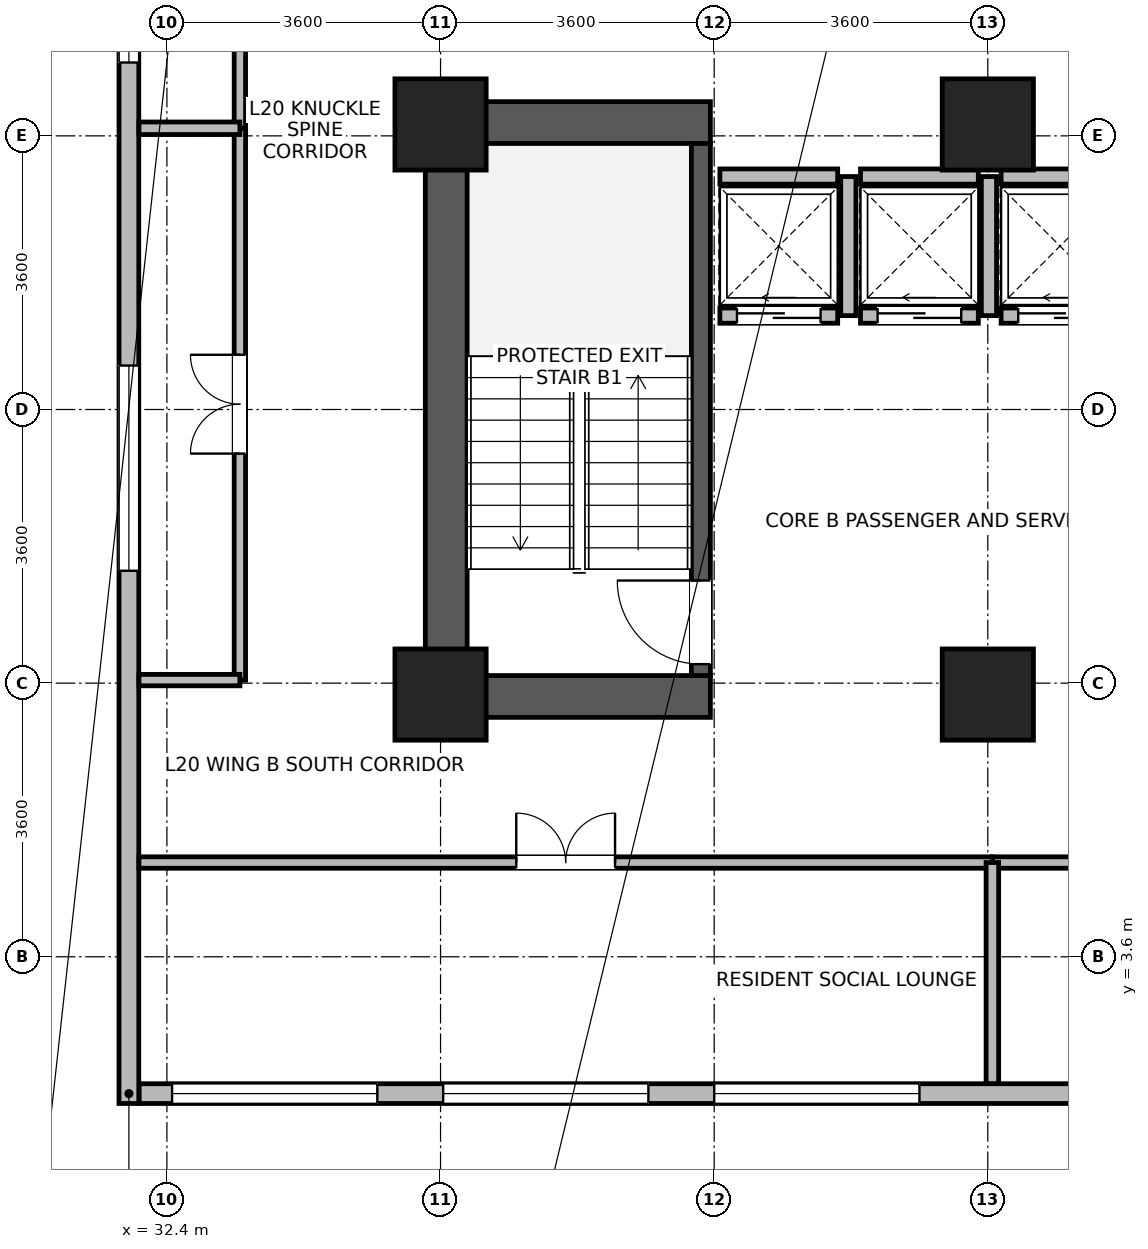
"""IFC4 building model, lengths in metres.
Left out: names, types, materials, properties, quantities, classifications, styles, units other than length and angle.
Written with IfcOpenShell. Run it as: python <this file> out.ifc"""

import sys

from ifc_helpers import new_model, si_unit, direction, frame, frame_2d, origin, origin_2d, place, context, subcontext, project, spatial, rectangle, extrude, source, transform, mapped, element, fill, save


model = new_model("IFC4")
c1 = context("Model", 3, precision=1e-05, world=origin(), true_north=direction((0.0, 1.0)))
c2 = subcontext(c1, "Body", "Model", "MODEL_VIEW")
j1 = project(units=[si_unit("LENGTHUNIT", "METRE"), si_unit("PLANEANGLEUNIT", "RADIAN")], contexts=[c1])
p1 = place(None, origin())
s1 = spatial("IfcSite", under=j1, at=p1, CompositionType="ELEMENT")
p2 = place(p1, origin())
s2 = spatial("IfcBuilding", under=s1, at=p2, CompositionType="ELEMENT")
p3 = place(p2, frame((0.0, 0.0, 82.3)))
s3 = spatial("IfcBuildingStorey", under=s2, at=p3, CompositionType="ELEMENT", Elevation=82.3)
p4 = place(p3, frame((36.075, 6.75, 0.0), z_axis=(0.0, 0.0, 1.0), x_axis=(0.0, 1.0, 0.0)))
e1 = element("IfcWall", 1, at=p4, inside=s3, PredefinedType="SHEAR", context=c2, shape_type="SweptSolid", body=[
    extrude(rectangle(XDim=8.1, YDim=0.55, at=frame_2d((4.05, 0.0))), origin(), (0.0, 0.0, 1.0), 3.45),
])
for number, where, z_axis, x_axis in (
    (2, (36.35, 7.025, 0.0), (0.0, 0.0, 1.0), (1.0, 0.0, 0.0)),
    (3, (36.35, 14.575, 0.0), (0.0, 0.0, 1.0), (1.0, 0.0, 0.0)),
):
    element("IfcWall", number, at=place(p3, frame(where, z_axis=z_axis, x_axis=x_axis)), inside=s3, PredefinedType="SHEAR", context=c2, shape_type="SweptSolid", body=[
        extrude(rectangle(XDim=3.2, YDim=0.55, at=frame_2d((1.6, 0.0))), origin(), (0.0, 0.0, 1.0), 3.45),
    ])
p5 = place(p3, frame((39.425, 7.3, 0.0), z_axis=(0.0, 0.0, 1.0), x_axis=(0.0, 1.0, 0.0)))
e4 = element("IfcWall", 4, at=p5, inside=s3, PredefinedType="SHEAR", context=c2, shape_type="SweptSolid", body=[
    extrude(rectangle(XDim=7.0, YDim=0.25, at=frame_2d((3.5, 0.0))), origin(), (0.0, 0.0, 1.0), 3.45),
])
p6 = place(p5, frame((0.15, 0.0, 0.0)))
e5 = element("IfcOpeningElement", 5, at=p6, cuts=e4, PredefinedType="OPENING", context=c2, shape_type="SweptSolid", body=[
    extrude(rectangle(XDim=1.1, YDim=2.08, at=frame_2d((0.55, 1.04))), frame((0.0, 0.135, 0.0), z_axis=(0.0, -1.0, 0.0), x_axis=(1.0, 0.0, 0.0)), (0.0, 0.0, 1.0), 0.27),
])
m1 = source(origin(), c2, "Body", "SweptSolid", [
    extrude(rectangle(XDim=1.2, YDim=1.2, at=origin_2d()), origin(), (0.0, 0.0, 1.0), 3.7),
])
for number, where, z_axis, x_axis in (
    (6, (36.0, 7.05, 0.0), (0.0, 0.0, 1.0), (1.0, 0.0, 0.0)),
    (7, (36.0, 14.55, 0.0), (0.0, 0.0, 1.0), (1.0, 0.0, 0.0)),
    (8, (43.2, 7.05, 0.0), (0.0, 0.0, 1.0), (1.0, 0.0, 0.0)),
    (9, (43.2, 14.55, 0.0), (0.0, 0.0, 1.0), (1.0, 0.0, 0.0)),
):
    element("IfcColumn", number, at=place(p3, frame(where, z_axis=z_axis, x_axis=x_axis)), inside=s3, PredefinedType="COLUMN", context=c2, shape_type="MappedRepresentation", body=[
        mapped(m1, transform((0.0, 0.0, 0.0), x_axis=(1.0, 0.0, 0.0), y_axis=(0.0, 1.0, 0.0), z_axis=(0.0, 0.0, 1.0), scale=1.0)),
    ])
p7 = place(p3, frame((60.565, 1.8, 0.0), z_axis=(0.0, 0.0, 1.0), x_axis=(-1.0, 0.0, 0.0)))
e10 = element("IfcWall", 10, at=p7, inside=s3, PredefinedType="STANDARD", context=c2, shape_type="SweptSolid", body=[
    extrude(rectangle(XDim=28.53, YDim=0.26, at=frame_2d((14.265, 0.0))), origin(), (0.0, 0.0, 1.0), 3.43),
])
p8 = place(p7, frame((0.433, 0.0, 0.85)))
e11 = element("IfcOpeningElement", 11, at=p8, cuts=e10, PredefinedType="OPENING", context=c2, shape_type="SweptSolid", body=[
    extrude(rectangle(XDim=2.7, YDim=2.05, at=frame_2d((1.35, 1.025))), frame((0.0, 0.14, 0.0), z_axis=(0.0, -1.0, 0.0), x_axis=(1.0, 0.0, 0.0)), (0.0, 0.0, 1.0), 0.28),
])
p9 = place(p7, frame((7.566, 0.0, 0.85)))
e12 = element("IfcOpeningElement", 12, at=p9, cuts=e10, PredefinedType="OPENING", context=c2, shape_type="SweptSolid", body=[
    extrude(rectangle(XDim=2.7, YDim=2.05, at=frame_2d((1.35, 1.025))), frame((0.0, 0.14, 0.0), z_axis=(0.0, -1.0, 0.0), x_axis=(1.0, 0.0, 0.0)), (0.0, 0.0, 1.0), 0.28),
])
p10 = place(p7, frame((11.132, 0.0, 0.85)))
e13 = element("IfcOpeningElement", 13, at=p10, cuts=e10, PredefinedType="OPENING", context=c2, shape_type="SweptSolid", body=[
    extrude(rectangle(XDim=2.7, YDim=2.05, at=frame_2d((1.35, 1.025))), frame((0.0, 0.14, 0.0), z_axis=(0.0, -1.0, 0.0), x_axis=(1.0, 0.0, 0.0)), (0.0, 0.0, 1.0), 0.28),
])
p11 = place(p7, frame((18.264, 0.0, 0.85)))
e14 = element("IfcOpeningElement", 14, at=p11, cuts=e10, PredefinedType="OPENING", context=c2, shape_type="SweptSolid", body=[
    extrude(rectangle(XDim=2.7, YDim=2.05, at=frame_2d((1.35, 1.025))), frame((0.0, 0.14, 0.0), z_axis=(0.0, -1.0, 0.0), x_axis=(1.0, 0.0, 0.0)), (0.0, 0.0, 1.0), 0.28),
])
p12 = place(p7, frame((21.831, 0.0, 0.85)))
e15 = element("IfcOpeningElement", 15, at=p12, cuts=e10, PredefinedType="OPENING", context=c2, shape_type="SweptSolid", body=[
    extrude(rectangle(XDim=2.7, YDim=2.05, at=frame_2d((1.35, 1.025))), frame((0.0, 0.14, 0.0), z_axis=(0.0, -1.0, 0.0), x_axis=(1.0, 0.0, 0.0)), (0.0, 0.0, 1.0), 0.28),
])
p13 = place(p7, frame((25.397, 0.0, 0.85)))
e16 = element("IfcOpeningElement", 16, at=p13, cuts=e10, PredefinedType="OPENING", context=c2, shape_type="SweptSolid", body=[
    extrude(rectangle(XDim=2.7, YDim=2.05, at=frame_2d((1.35, 1.025))), frame((0.0, 0.14, 0.0), z_axis=(0.0, -1.0, 0.0), x_axis=(1.0, 0.0, 0.0)), (0.0, 0.0, 1.0), 0.28),
])
p14 = place(p3, frame((31.9, 1.67, 0.0), z_axis=(0.0, 0.0, 1.0), x_axis=(0.0, 1.0, 0.0)))
e17 = element("IfcWall", 17, at=p14, inside=s3, PredefinedType="STANDARD", context=c2, shape_type="SweptSolid", body=[
    extrude(rectangle(XDim=20.06, YDim=0.26, at=frame_2d((10.03, 0.0))), origin(), (0.0, 0.0, 1.0), 3.43),
])
p15 = place(p14, frame((7.008, 0.0, 0.85)))
e18 = element("IfcOpeningElement", 18, at=p15, cuts=e17, PredefinedType="OPENING", context=c2, shape_type="SweptSolid", body=[
    extrude(rectangle(XDim=2.7, YDim=2.05, at=frame_2d((1.35, 1.025))), frame((0.0, 0.14, 0.0), z_axis=(0.0, -1.0, 0.0), x_axis=(1.0, 0.0, 0.0)), (0.0, 0.0, 1.0), 0.28),
])
p16 = place(p14, frame((13.695, 0.0, 0.85)))
e19 = element("IfcOpeningElement", 19, at=p16, cuts=e17, PredefinedType="OPENING", context=c2, shape_type="SweptSolid", body=[
    extrude(rectangle(XDim=2.7, YDim=2.05, at=frame_2d((1.35, 1.025))), frame((0.0, 0.14, 0.0), z_axis=(0.0, -1.0, 0.0), x_axis=(1.0, 0.0, 0.0)), (0.0, 0.0, 1.0), 0.28),
])
p17 = place(p3, frame((39.675, 12.035, 0.0), z_axis=(0.0, 0.0, 1.0), x_axis=(1.0, 0.0, 0.0)))
e20 = element("IfcWall", 20, at=p17, inside=s3, PredefinedType="PARTITIONING", context=c2, shape_type="SweptSolid", body=[
    extrude(rectangle(XDim=1.55, YDim=0.2, at=frame_2d((0.775, 0.0))), origin(), (0.0, 0.0, 1.0), 3.43),
])
p18 = place(p17, frame((0.225, 0.0, 0.0)))
e21 = element("IfcOpeningElement", 21, at=p18, cuts=e20, PredefinedType="OPENING", context=c2, shape_type="SweptSolid", body=[
    extrude(rectangle(XDim=1.1, YDim=2.12, at=frame_2d((0.55, 1.06))), frame((0.0, 0.11, 0.0), z_axis=(0.0, -1.0, 0.0), x_axis=(1.0, 0.0, 0.0)), (0.0, 0.0, 1.0), 0.22),
])
p19 = place(p3, frame((39.675, 13.865, 0.0), z_axis=(0.0, 0.0, 1.0), x_axis=(1.0, 0.0, 0.0)))
e22 = element("IfcWall", 22, at=p19, inside=s3, PredefinedType="PARTITIONING", context=c2, shape_type="SweptSolid", body=[
    extrude(rectangle(XDim=1.55, YDim=0.2, at=frame_2d((0.775, 0.0))), origin(), (0.0, 0.0, 1.0), 3.43),
])
p20 = place(p3, frame((41.365, 12.035, 0.0), z_axis=(0.0, 0.0, 1.0), x_axis=(0.0, 1.0, 0.0)))
e23 = element("IfcWall", 23, at=p20, inside=s3, PredefinedType="PARTITIONING", context=c2, shape_type="SweptSolid", body=[
    extrude(rectangle(XDim=1.83, YDim=0.2, at=frame_2d((0.915, 0.0))), origin(), (0.0, 0.0, 1.0), 3.43),
])
p21 = place(p3, frame((41.525, 12.035, 0.0), z_axis=(0.0, 0.0, 1.0), x_axis=(1.0, 0.0, 0.0)))
e24 = element("IfcWall", 24, at=p21, inside=s3, PredefinedType="PARTITIONING", context=c2, shape_type="SweptSolid", body=[
    extrude(rectangle(XDim=1.55, YDim=0.2, at=frame_2d((0.775, 0.0))), origin(), (0.0, 0.0, 1.0), 3.43),
])
p22 = place(p21, frame((0.225, 0.0, 0.0)))
e25 = element("IfcOpeningElement", 25, at=p22, cuts=e24, PredefinedType="OPENING", context=c2, shape_type="SweptSolid", body=[
    extrude(rectangle(XDim=1.1, YDim=2.12, at=frame_2d((0.55, 1.06))), frame((0.0, 0.11, 0.0), z_axis=(0.0, -1.0, 0.0), x_axis=(1.0, 0.0, 0.0)), (0.0, 0.0, 1.0), 0.22),
])
p23 = place(p3, frame((41.525, 13.865, 0.0), z_axis=(0.0, 0.0, 1.0), x_axis=(1.0, 0.0, 0.0)))
e26 = element("IfcWall", 26, at=p23, inside=s3, PredefinedType="PARTITIONING", context=c2, shape_type="SweptSolid", body=[
    extrude(rectangle(XDim=1.55, YDim=0.2, at=frame_2d((0.775, 0.0))), origin(), (0.0, 0.0, 1.0), 3.43),
])
p24 = place(p3, frame((43.215, 12.035, 0.0), z_axis=(0.0, 0.0, 1.0), x_axis=(0.0, 1.0, 0.0)))
e27 = element("IfcWall", 27, at=p24, inside=s3, PredefinedType="PARTITIONING", context=c2, shape_type="SweptSolid", body=[
    extrude(rectangle(XDim=1.83, YDim=0.2, at=frame_2d((0.915, 0.0))), origin(), (0.0, 0.0, 1.0), 3.43),
])
p25 = place(p3, frame((43.375, 12.035, 0.0), z_axis=(0.0, 0.0, 1.0), x_axis=(1.0, 0.0, 0.0)))
e28 = element("IfcWall", 28, at=p25, inside=s3, PredefinedType="PARTITIONING", context=c2, shape_type="SweptSolid", body=[
    extrude(rectangle(XDim=1.55, YDim=0.2, at=frame_2d((0.775, 0.0))), origin(), (0.0, 0.0, 1.0), 3.43),
])
p26 = place(p25, frame((0.225, 0.0, 0.0)))
e29 = element("IfcOpeningElement", 29, at=p26, cuts=e28, PredefinedType="OPENING", context=c2, shape_type="SweptSolid", body=[
    extrude(rectangle(XDim=1.1, YDim=2.12, at=frame_2d((0.55, 1.06))), frame((0.0, 0.11, 0.0), z_axis=(0.0, -1.0, 0.0), x_axis=(1.0, 0.0, 0.0)), (0.0, 0.0, 1.0), 0.22),
])
p27 = place(p3, frame((43.375, 13.865, 0.0), z_axis=(0.0, 0.0, 1.0), x_axis=(1.0, 0.0, 0.0)))
e30 = element("IfcWall", 30, at=p27, inside=s3, PredefinedType="PARTITIONING", context=c2, shape_type="SweptSolid", body=[
    extrude(rectangle(XDim=1.55, YDim=0.2, at=frame_2d((0.775, 0.0))), origin(), (0.0, 0.0, 1.0), 3.43),
])
p28 = place(p3, frame((43.26, 4.84, 0.0), z_axis=(0.0, 0.0, 1.0), x_axis=(1.0, 0.0, 0.0)))
e31 = element("IfcWall", 31, at=p28, inside=s3, PredefinedType="PARTITIONING", context=c2, shape_type="SweptSolid", body=[
    extrude(rectangle(XDim=11.76, YDim=0.15, at=frame_2d((5.88, 0.0))), origin(), (0.0, 0.0, 1.0), 3.43),
])
p29 = place(p28, frame((5.23, 0.0, 0.0)))
e32 = element("IfcOpeningElement", 32, at=p29, cuts=e31, PredefinedType="OPENING", context=c2, shape_type="SweptSolid", body=[
    extrude(rectangle(XDim=1.3, YDim=2.12, at=frame_2d((0.65, 1.06))), frame((0.0, 0.085, 0.0), z_axis=(0.0, -1.0, 0.0), x_axis=(1.0, 0.0, 0.0)), (0.0, 0.0, 1.0), 0.17),
])
p30 = place(p3, frame((32.032, 4.84, 0.0), z_axis=(0.0, 0.0, 1.0), x_axis=(1.0, 0.0, 0.0)))
e33 = element("IfcWall", 33, at=p30, inside=s3, PredefinedType="PARTITIONING", context=c2, shape_type="SweptSolid", body=[
    extrude(rectangle(XDim=11.228, YDim=0.15, at=frame_2d((5.614, 0.0))), origin(), (0.0, 0.0, 1.0), 3.43),
])
p31 = place(p30, frame((4.964, 0.0, 0.0)))
e34 = element("IfcOpeningElement", 34, at=p31, cuts=e33, PredefinedType="OPENING", context=c2, shape_type="SweptSolid", body=[
    extrude(rectangle(XDim=1.3, YDim=2.12, at=frame_2d((0.65, 1.06))), frame((0.0, 0.085, 0.0), z_axis=(0.0, -1.0, 0.0), x_axis=(1.0, 0.0, 0.0)), (0.0, 0.0, 1.0), 0.17),
])
p32 = place(p3, frame((33.36, 7.24, 0.0), z_axis=(0.0, 0.0, 1.0), x_axis=(0.0, 1.0, 0.0)))
e35 = element("IfcWall", 35, at=p32, inside=s3, PredefinedType="PARTITIONING", context=c2, shape_type="SweptSolid", body=[
    extrude(rectangle(XDim=7.26, YDim=0.15, at=frame_2d((3.63, 0.0))), origin(), (0.0, 0.0, 1.0), 3.43),
])
p33 = place(p32, frame((2.98, 0.0, 0.0)))
e36 = element("IfcOpeningElement", 36, at=p33, cuts=e35, PredefinedType="OPENING", context=c2, shape_type="SweptSolid", body=[
    extrude(rectangle(XDim=1.3, YDim=2.12, at=frame_2d((0.65, 1.06))), frame((0.0, 0.085, 0.0), z_axis=(0.0, -1.0, 0.0), x_axis=(1.0, 0.0, 0.0)), (0.0, 0.0, 1.0), 0.17),
])
p34 = place(p3, frame((33.36, 14.5, 0.0), z_axis=(0.0, 0.0, 1.0), x_axis=(0.0, 1.0, 0.0)))
e37 = element("IfcWall", 37, at=p34, inside=s3, PredefinedType="PARTITIONING", context=c2, shape_type="SweptSolid", body=[
    extrude(rectangle(XDim=7.1, YDim=0.15, at=frame_2d((3.55, 0.0))), origin(), (0.0, 0.0, 1.0), 3.43),
])
p35 = place(p34, frame((2.9, 0.0, 0.0)))
e38 = element("IfcOpeningElement", 38, at=p35, cuts=e37, PredefinedType="OPENING", context=c2, shape_type="SweptSolid", body=[
    extrude(rectangle(XDim=1.3, YDim=2.12, at=frame_2d((0.65, 1.06))), frame((0.0, 0.085, 0.0), z_axis=(0.0, -1.0, 0.0), x_axis=(1.0, 0.0, 0.0)), (0.0, 0.0, 1.0), 0.17),
])
p36 = place(p3, frame((32.032, 7.24, 0.0), z_axis=(0.0, 0.0, 1.0), x_axis=(1.0, 0.0, 0.0)))
e39 = element("IfcWall", 39, at=p36, inside=s3, PredefinedType="PARTITIONING", context=c2, shape_type="SweptSolid", body=[
    extrude(rectangle(XDim=1.328, YDim=0.15, at=frame_2d((0.664, 0.0))), origin(), (0.0, 0.0, 1.0), 3.43),
])
p37 = place(p3, frame((43.26, 1.932, 0.0), z_axis=(0.0, 0.0, 1.0), x_axis=(0.0, 1.0, 0.0)))
e40 = element("IfcWall", 40, at=p37, inside=s3, PredefinedType="PARTITIONING", context=c2, shape_type="SweptSolid", body=[
    extrude(rectangle(XDim=2.908, YDim=0.165, at=frame_2d((1.454, 0.0))), origin(), (0.0, 0.0, 1.0), 3.43),
])
p38 = place(p3, frame((32.032, 14.5, 0.0), z_axis=(0.0, 0.0, 1.0), x_axis=(1.0, 0.0, 0.0)))
e41 = element("IfcWall", 41, at=p38, inside=s3, PredefinedType="PARTITIONING", context=c2, shape_type="SweptSolid", body=[
    extrude(rectangle(XDim=1.328, YDim=0.165, at=frame_2d((0.664, 0.0))), origin(), (0.0, 0.0, 1.0), 3.43),
])
p39 = place(p11, origin())
e42 = element("IfcWindow", 42, at=p39, inside=s3, PartitioningType="SINGLE_PANEL", PredefinedType="WINDOW", context=c2, shape_type="SweptSolid", body=[
    extrude(rectangle(XDim=2.7, YDim=2.05, at=frame_2d((1.35, 1.025))), frame((0.0, 0.03, 0.0), z_axis=(0.0, -1.0, 0.0), x_axis=(1.0, 0.0, 0.0)), (0.0, 0.0, 1.0), 0.06),
])
fill(e14, e42)
p40 = place(p12, origin())
e43 = element("IfcWindow", 43, at=p40, inside=s3, PartitioningType="SINGLE_PANEL", PredefinedType="WINDOW", context=c2, shape_type="SweptSolid", body=[
    extrude(rectangle(XDim=2.7, YDim=2.05, at=frame_2d((1.35, 1.025))), frame((0.0, 0.03, 0.0), z_axis=(0.0, -1.0, 0.0), x_axis=(1.0, 0.0, 0.0)), (0.0, 0.0, 1.0), 0.06),
])
fill(e15, e43)
p41 = place(p13, origin())
e44 = element("IfcWindow", 44, at=p41, inside=s3, PartitioningType="SINGLE_PANEL", PredefinedType="WINDOW", context=c2, shape_type="SweptSolid", body=[
    extrude(rectangle(XDim=2.7, YDim=2.05, at=frame_2d((1.35, 1.025))), frame((0.0, 0.03, 0.0), z_axis=(0.0, -1.0, 0.0), x_axis=(1.0, 0.0, 0.0)), (0.0, 0.0, 1.0), 0.06),
])
fill(e16, e44)
p42 = place(p15, origin())
e45 = element("IfcWindow", 45, at=p42, inside=s3, PartitioningType="SINGLE_PANEL", PredefinedType="WINDOW", context=c2, shape_type="SweptSolid", body=[
    extrude(rectangle(XDim=2.7, YDim=2.05, at=frame_2d((1.35, 1.025))), frame((0.0, 0.03, 0.0), z_axis=(0.0, -1.0, 0.0), x_axis=(1.0, 0.0, 0.0)), (0.0, 0.0, 1.0), 0.06),
])
fill(e18, e45)
p43 = place(p16, origin())
e46 = element("IfcWindow", 46, at=p43, inside=s3, PartitioningType="SINGLE_PANEL", PredefinedType="WINDOW", context=c2, shape_type="SweptSolid", body=[
    extrude(rectangle(XDim=2.7, YDim=2.05, at=frame_2d((1.35, 1.025))), frame((0.0, 0.03, 0.0), z_axis=(0.0, -1.0, 0.0), x_axis=(1.0, 0.0, 0.0)), (0.0, 0.0, 1.0), 0.06),
])
fill(e19, e46)
p44 = place(p6, origin())
e47 = element("IfcDoor", 47, at=p44, inside=s3, OperationType="SINGLE_SWING_RIGHT", PredefinedType="DOOR", context=c2, shape_type="SweptSolid", body=[
    extrude(rectangle(XDim=1.1, YDim=2.08, at=frame_2d((0.55, 1.04))), frame((0.0, 0.025, 0.0), z_axis=(0.0, -1.0, 0.0), x_axis=(1.0, 0.0, 0.0)), (0.0, 0.0, 1.0), 0.05),
])
fill(e5, e47)
p45 = place(p18, origin())
e48 = element("IfcDoor", 48, at=p45, inside=s3, OperationType="SLIDING_TO_LEFT", PredefinedType="DOOR", context=c2, shape_type="SweptSolid", body=[
    extrude(rectangle(XDim=1.1, YDim=2.12, at=frame_2d((0.55, 1.06))), frame((0.0, 0.025, 0.0), z_axis=(0.0, -1.0, 0.0), x_axis=(1.0, 0.0, 0.0)), (0.0, 0.0, 1.0), 0.05),
])
fill(e21, e48)
p46 = place(p22, origin())
e49 = element("IfcDoor", 49, at=p46, inside=s3, OperationType="SLIDING_TO_LEFT", PredefinedType="DOOR", context=c2, shape_type="SweptSolid", body=[
    extrude(rectangle(XDim=1.1, YDim=2.12, at=frame_2d((0.55, 1.06))), frame((0.0, 0.025, 0.0), z_axis=(0.0, -1.0, 0.0), x_axis=(1.0, 0.0, 0.0)), (0.0, 0.0, 1.0), 0.05),
])
fill(e25, e49)
p47 = place(p26, origin())
e50 = element("IfcDoor", 50, at=p47, inside=s3, OperationType="SLIDING_TO_LEFT", PredefinedType="DOOR", context=c2, shape_type="SweptSolid", body=[
    extrude(rectangle(XDim=1.1, YDim=2.12, at=frame_2d((0.55, 1.06))), frame((0.0, 0.025, 0.0), z_axis=(0.0, -1.0, 0.0), x_axis=(1.0, 0.0, 0.0)), (0.0, 0.0, 1.0), 0.05),
])
fill(e29, e50)
p48 = place(p31, origin())
e51 = element("IfcDoor", 51, at=p48, inside=s3, OperationType="DOUBLE_DOOR_SINGLE_SWING", PredefinedType="DOOR", context=c2, shape_type="SweptSolid", body=[
    extrude(rectangle(XDim=1.3, YDim=2.12, at=frame_2d((0.65, 1.06))), frame((0.0, 0.025, 0.0), z_axis=(0.0, -1.0, 0.0), x_axis=(1.0, 0.0, 0.0)), (0.0, 0.0, 1.0), 0.05),
])
fill(e34, e51)
p49 = place(p33, origin())
e52 = element("IfcDoor", 52, at=p49, inside=s3, OperationType="DOUBLE_DOOR_SINGLE_SWING", PredefinedType="DOOR", context=c2, shape_type="SweptSolid", body=[
    extrude(rectangle(XDim=1.3, YDim=2.12, at=frame_2d((0.65, 1.06))), frame((0.0, 0.025, 0.0), z_axis=(0.0, -1.0, 0.0), x_axis=(1.0, 0.0, 0.0)), (0.0, 0.0, 1.0), 0.05),
])
fill(e36, e52)
save(model, sys.argv[1])
